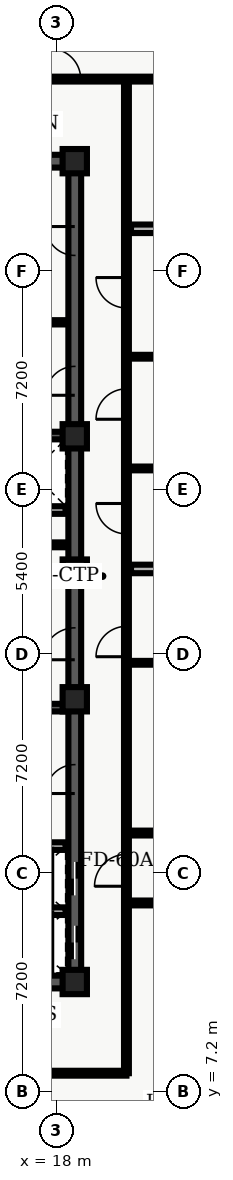
"""IFC4 building model, lengths in metres.
Left out: names, types, materials, properties, quantities, classifications, styles, units other than length and angle.
Written with IfcOpenShell. Run it as: python <this file> out.ifc"""

import sys

from ifc_helpers import new_model, entity, si_unit, converted_unit, direction, frame, origin_with_axes, origin_2d_with_axis, place, context, subcontext, project, spatial, polyline, rectangle, outline, extrude, element, fill, save


model = new_model("IFC4")
c1 = context("Model", 3, precision=1e-05, world=origin_with_axes(), true_north=direction((0.0, 1.0)))
c2 = subcontext(c1, "Body", "Model", "MODEL_VIEW")
j1 = project(units=[si_unit("LENGTHUNIT", "METRE"), converted_unit("PLANEANGLEUNIT", "DEGREE", entity("IfcPlaneAngleMeasure", 0.017), si_unit("PLANEANGLEUNIT", "RADIAN"), dimensions=[0, 0, 0, 0, 0, 0, 0])], contexts=[c1])
p1 = place(None, origin_with_axes())
s1 = spatial("IfcSite", under=j1, at=p1, CompositionType="ELEMENT")
p2 = place(p1, origin_with_axes())
s2 = spatial("IfcBuilding", under=s1, at=p2, CompositionType="ELEMENT")
p3 = place(p2, frame((0.0, 0.0, 280.2), z_axis=(0.0, 0.0, 1.0), x_axis=(1.0, 0.0, 0.0)))
s3 = spatial("IfcBuildingStorey", under=s2, at=p3, CompositionType="ELEMENT", Elevation=280.2)
p4 = place(p3, frame((11.4, 10.8, 0.0), z_axis=(0.0, 0.0, 1.0), x_axis=(1.0, 0.0, 0.0)))
e1 = element("IfcWall", 1, at=p4, inside=s3, PredefinedType="SHEAR", context=c2, shape_type="SweptSolid", body=[
    extrude(outline(polyline([(0.0, -0.21), (7.2, -0.21), (7.2, 0.21), (0.0, 0.21), (0.0, -0.21)])), origin_with_axes(), (0.0, 0.0, 1.0), 3.66),
])
p5 = place(p4, frame((2.625, 0.0, 0.0), z_axis=(0.0, 0.0, 1.0), x_axis=(1.0, 0.0, 0.0)))
e2 = element("IfcOpeningElement", 2, at=p5, cuts=e1, PredefinedType="OPENING", context=c2, shape_type="SweptSolid", body=[
    extrude(rectangle(XDim=1.05, YDim=0.44, at=origin_2d_with_axis()), origin_with_axes(), (0.0, 0.0, 1.0), 2.15),
])
p6 = place(p3, frame((11.4, 37.8, 0.0), z_axis=(0.0, 0.0, 1.0), x_axis=(1.0, 0.0, 0.0)))
e3 = element("IfcWall", 3, at=p6, inside=s3, PredefinedType="SHEAR", context=c2, shape_type="SweptSolid", body=[
    extrude(outline(polyline([(0.0, -0.21), (7.2, -0.21), (7.2, 0.21), (0.0, 0.21), (0.0, -0.21)])), origin_with_axes(), (0.0, 0.0, 1.0), 3.66),
])
p7 = place(p6, frame((2.625, 0.0, 0.0), z_axis=(0.0, 0.0, 1.0), x_axis=(1.0, 0.0, 0.0)))
e4 = element("IfcOpeningElement", 4, at=p7, cuts=e3, PredefinedType="OPENING", context=c2, shape_type="SweptSolid", body=[
    extrude(rectangle(XDim=1.05, YDim=0.44, at=origin_2d_with_axis()), origin_with_axes(), (0.0, 0.0, 1.0), 2.15),
])
p8 = place(p3, frame((18.6, 10.8, 0.0), z_axis=(0.0, 0.0, 1.0), x_axis=(0.0, 1.0, 0.0)))
e5 = element("IfcWall", 5, at=p8, inside=s3, PredefinedType="SHEAR", context=c2, shape_type="SweptSolid", body=[
    extrude(outline(polyline([(0.0, -0.21), (13.5, -0.21), (13.5, 0.21), (0.0, 0.21), (0.0, -0.21)])), origin_with_axes(), (0.0, 0.0, 1.0), 3.66),
])
p9 = place(p8, frame((1.3, 0.0, 0.0), z_axis=(0.0, 0.0, 1.0), x_axis=(1.0, 0.0, 0.0)))
e6 = element("IfcOpeningElement", 6, at=p9, cuts=e5, PredefinedType="OPENING", context=c2, shape_type="SweptSolid", body=[
    extrude(rectangle(XDim=1.1, YDim=0.44, at=origin_2d_with_axis()), origin_with_axes(), (0.0, 0.0, 1.0), 2.15),
])
p10 = place(p8, frame((3.4, 0.0, 0.0), z_axis=(0.0, 0.0, 1.0), x_axis=(1.0, 0.0, 0.0)))
e7 = element("IfcOpeningElement", 7, at=p10, cuts=e5, PredefinedType="OPENING", context=c2, shape_type="SweptSolid", body=[
    extrude(rectangle(XDim=1.1, YDim=0.44, at=origin_2d_with_axis()), origin_with_axes(), (0.0, 0.0, 1.0), 2.15),
])
p11 = place(p8, frame((11.125, 0.0, 0.0), z_axis=(0.0, 0.0, 1.0), x_axis=(1.0, 0.0, 0.0)))
e8 = element("IfcOpeningElement", 8, at=p11, cuts=e5, PredefinedType="OPENING", context=c2, shape_type="SweptSolid", body=[
    extrude(rectangle(XDim=1.05, YDim=0.44, at=origin_2d_with_axis()), origin_with_axes(), (0.0, 0.0, 1.0), 2.15),
])
p12 = place(p8, frame((6.675, 0.0, 0.0), z_axis=(0.0, 0.0, 1.0), x_axis=(1.0, 0.0, 0.0)))
e9 = element("IfcOpeningElement", 9, at=p12, cuts=e5, PredefinedType="OPENING", context=c2, shape_type="SweptSolid", body=[
    extrude(rectangle(XDim=0.95, YDim=0.44, at=origin_2d_with_axis()), origin_with_axes(), (0.0, 0.0, 1.0), 2.15),
])
p13 = place(p3, frame((18.6, 24.3, 0.0), z_axis=(0.0, 0.0, 1.0), x_axis=(0.0, 1.0, 0.0)))
e10 = element("IfcWall", 10, at=p13, inside=s3, PredefinedType="SHEAR", context=c2, shape_type="SweptSolid", body=[
    extrude(outline(polyline([(0.0, -0.21), (13.5, -0.21), (13.5, 0.21), (0.0, 0.21), (0.0, -0.21)])), origin_with_axes(), (0.0, 0.0, 1.0), 3.66),
])
p14 = place(p13, frame((6.275, 0.0, 0.0), z_axis=(0.0, 0.0, 1.0), x_axis=(1.0, 0.0, 0.0)))
e11 = element("IfcOpeningElement", 11, at=p14, cuts=e10, PredefinedType="OPENING", context=c2, shape_type="SweptSolid", body=[
    extrude(rectangle(XDim=0.95, YDim=0.44, at=origin_2d_with_axis()), origin_with_axes(), (0.0, 0.0, 1.0), 2.15),
])
p15 = place(p13, frame((10.875, 0.0, 0.0), z_axis=(0.0, 0.0, 1.0), x_axis=(1.0, 0.0, 0.0)))
e12 = element("IfcOpeningElement", 12, at=p15, cuts=e10, PredefinedType="OPENING", context=c2, shape_type="SweptSolid", body=[
    extrude(rectangle(XDim=0.95, YDim=0.44, at=origin_2d_with_axis()), origin_with_axes(), (0.0, 0.0, 1.0), 2.15),
])
for number, where, z_axis, x_axis in (
    (13, (11.61, 19.825, 0.0), (0.0, 0.0, 1.0), (1.0, 0.0, 0.0)),
    (14, (11.61, 28.775, 0.0), (0.0, 0.0, 1.0), (1.0, 0.0, 0.0)),
):
    element("IfcWall", number, at=place(p3, frame(where, z_axis=z_axis, x_axis=x_axis)), inside=s3, PredefinedType="SHEAR", context=c2, shape_type="SweptSolid", body=[
        extrude(outline(polyline([(0.0, -0.125), (6.78, -0.125), (6.78, 0.125), (0.0, 0.125), (0.0, -0.125)])), origin_with_axes(), (0.0, 0.0, 1.0), 3.66),
    ])
p16 = place(p3, frame((11.7, 24.1, 0.0), z_axis=(0.0, 0.0, 1.0), x_axis=(1.0, 0.0, 0.0)))
e15 = element("IfcWall", 15, at=p16, inside=s3, PredefinedType="SOLIDWALL", context=c2, shape_type="SweptSolid", body=[
    extrude(outline(polyline([(0.0, -0.125), (6.6, -0.125), (6.6, 0.125), (0.0, 0.125), (0.0, -0.125)])), origin_with_axes(), (0.0, 0.0, 1.0), 2.7),
])
p17 = place(p16, frame((3.75, 0.0, 0.0), z_axis=(0.0, 0.0, 1.0), x_axis=(1.0, 0.0, 0.0)))
e16 = element("IfcOpeningElement", 16, at=p17, cuts=e15, PredefinedType="OPENING", context=c2, shape_type="SweptSolid", body=[
    extrude(rectangle(XDim=0.9, YDim=0.27, at=origin_2d_with_axis()), origin_with_axes(), (0.0, 0.0, 1.0), 2.15),
])
p18 = place(p3, frame((11.7, 26.325, 0.0), z_axis=(0.0, 0.0, 1.0), x_axis=(1.0, 0.0, 0.0)))
e17 = element("IfcWall", 17, at=p18, inside=s3, PredefinedType="SOLIDWALL", context=c2, shape_type="SweptSolid", body=[
    extrude(outline(polyline([(0.0, -0.125), (6.6, -0.125), (6.6, 0.125), (0.0, 0.125), (0.0, -0.125)])), origin_with_axes(), (0.0, 0.0, 1.0), 2.7),
])
p19 = place(p18, frame((3.5, 0.0, 0.0), z_axis=(0.0, 0.0, 1.0), x_axis=(1.0, 0.0, 0.0)))
e18 = element("IfcOpeningElement", 18, at=p19, cuts=e17, PredefinedType="OPENING", context=c2, shape_type="SweptSolid", body=[
    extrude(rectangle(XDim=0.9, YDim=0.27, at=origin_2d_with_axis()), origin_with_axes(), (0.0, 0.0, 1.0), 2.15),
])
for number, where, z_axis, x_axis in (
    (19, (18.6, 10.8, 0.0), (0.0, 0.0, 1.0), (1.0, 0.0, 0.0)),
    (20, (18.6, 20.1, 0.0), (0.0, 0.0, 1.0), (1.0, 0.0, 0.0)),
    (21, (18.6, 24.3, 0.0), (0.0, 0.0, 1.0), (1.0, 0.0, 0.0)),
    (22, (18.6, 28.75, 0.0), (0.0, 0.0, 1.0), (1.0, 0.0, 0.0)),
    (23, (18.6, 37.8, 0.0), (0.0, 0.0, 1.0), (1.0, 0.0, 0.0)),
):
    element("IfcColumn", number, at=place(p3, frame(where, z_axis=z_axis, x_axis=x_axis)), inside=s3, PredefinedType="COLUMN", context=c2, shape_type="SweptSolid", body=[
        extrude(rectangle(XDim=0.8, YDim=0.8, at=origin_2d_with_axis()), origin_with_axes(), (0.0, 0.0, 1.0), 3.9),
    ])
p20 = place(p3, frame((14.62, 25.18, 0.0), z_axis=(0.0, 0.0, 1.0), x_axis=(1.0, 0.0, 0.0)))
e24 = element("IfcWall", 24, at=p20, inside=s3, PredefinedType="PARTITIONING", context=c2, shape_type="SweptSolid", body=[
    extrude(outline(polyline([(0.0, -0.08), (3.68, -0.08), (3.68, 0.08), (0.0, 0.08), (0.0, -0.08)])), origin_with_axes(), (0.0, 0.0, 1.0), 2.7),
])
p21 = place(p20, frame((1.95, 0.0, 0.0), z_axis=(0.0, 0.0, 1.0), x_axis=(1.0, 0.0, 0.0)))
e25 = element("IfcOpeningElement", 25, at=p21, cuts=e24, PredefinedType="OPENING", context=c2, shape_type="SweptSolid", body=[
    extrude(rectangle(XDim=0.9, YDim=0.18, at=origin_2d_with_axis()), origin_with_axes(), (0.0, 0.0, 1.0), 2.15),
])
for number, where, z_axis, x_axis in (
    (26, (15.84, 13.13, 0.0), (0.0, 0.0, 1.0), (1.0, 0.0, 0.0)),
    (27, (15.84, 15.27, 0.0), (0.0, 0.0, 1.0), (1.0, 0.0, 0.0)),
):
    element("IfcWall", number, at=place(p3, frame(where, z_axis=z_axis, x_axis=x_axis)), inside=s3, PredefinedType="SOLIDWALL", context=c2, shape_type="SweptSolid", body=[
        extrude(outline(polyline([(0.0, -0.125), (2.46, -0.125), (2.46, 0.125), (0.0, 0.125), (0.0, -0.125)])), origin_with_axes(), (0.0, 0.0, 1.0), 2.7),
    ])
p22 = place(p3, frame((15.84, 32.5, 0.0), z_axis=(0.0, 0.0, 1.0), x_axis=(1.0, 0.0, 0.0)))
e28 = element("IfcWall", 28, at=p22, inside=s3, PredefinedType="PARTITIONING", context=c2, shape_type="SweptSolid", body=[
    extrude(outline(polyline([(0.0, -0.07), (2.46, -0.07), (2.46, 0.07), (0.0, 0.07), (0.0, -0.07)])), origin_with_axes(), (0.0, 0.0, 1.0), 2.7),
])
p23 = place(p3, frame((8.135, 7.8, 0.0), z_axis=(0.0, 0.0, 1.0), x_axis=(1.0, 0.0, 0.0)))
e29 = element("IfcWall", 29, at=p23, inside=s3, PredefinedType="PARTITIONING", context=c2, shape_type="SweptSolid", body=[
    extrude(outline(polyline([(0.0, -0.08), (12.165, -0.08), (12.165, 0.08), (0.0, 0.08), (0.0, -0.08)])), origin_with_axes(), (0.0, 0.0, 1.0), 2.7),
])
p24 = place(p23, frame((6.065, 0.0, 0.0), z_axis=(0.0, 0.0, 1.0), x_axis=(1.0, 0.0, 0.0)))
e30 = element("IfcOpeningElement", 30, at=p24, cuts=e29, PredefinedType="OPENING", context=c2, shape_type="SweptSolid", body=[
    extrude(rectangle(XDim=1.0, YDim=0.18, at=origin_2d_with_axis()), origin_with_axes(), (0.0, 0.0, 1.0), 2.15),
])
p25 = place(p3, frame((8.135, 40.5, 0.0), z_axis=(0.0, 0.0, 1.0), x_axis=(1.0, 0.0, 0.0)))
e31 = element("IfcWall", 31, at=p25, inside=s3, PredefinedType="PARTITIONING", context=c2, shape_type="SweptSolid", body=[
    extrude(outline(polyline([(0.0, -0.08), (23.93, -0.08), (23.93, 0.08), (0.0, 0.08), (0.0, -0.08)])), origin_with_axes(), (0.0, 0.0, 1.0), 2.7),
])
p26 = place(p25, frame((0.871, 0.0, 0.0), z_axis=(0.0, 0.0, 1.0), x_axis=(1.0, 0.0, 0.0)))
e32 = element("IfcOpeningElement", 32, at=p26, cuts=e31, PredefinedType="OPENING", context=c2, shape_type="SweptSolid", body=[
    extrude(rectangle(XDim=1.0, YDim=0.18, at=origin_2d_with_axis()), origin_with_axes(), (0.0, 0.0, 1.0), 2.15),
])
p27 = place(p25, frame((6.56, 0.0, 0.0), z_axis=(0.0, 0.0, 1.0), x_axis=(1.0, 0.0, 0.0)))
e33 = element("IfcOpeningElement", 33, at=p27, cuts=e31, PredefinedType="OPENING", context=c2, shape_type="SweptSolid", body=[
    extrude(rectangle(XDim=1.0, YDim=0.18, at=origin_2d_with_axis()), origin_with_axes(), (0.0, 0.0, 1.0), 2.15),
])
p28 = place(p25, frame((10.16, 0.0, 0.0), z_axis=(0.0, 0.0, 1.0), x_axis=(1.0, 0.0, 0.0)))
e34 = element("IfcOpeningElement", 34, at=p28, cuts=e31, PredefinedType="OPENING", context=c2, shape_type="SweptSolid", body=[
    extrude(rectangle(XDim=1.0, YDim=0.18, at=origin_2d_with_axis()), origin_with_axes(), (0.0, 0.0, 1.0), 2.15),
])
p29 = place(p3, frame((20.3, 7.8, 0.0), z_axis=(0.0, 0.0, 1.0), x_axis=(0.0, 1.0, 0.0)))
e35 = element("IfcWall", 35, at=p29, inside=s3, PredefinedType="PARTITIONING", context=c2, shape_type="SweptSolid", body=[
    extrude(outline(polyline([(0.0, -0.08), (32.7, -0.08), (32.7, 0.08), (0.0, 0.08), (0.0, -0.08)])), origin_with_axes(), (0.0, 0.0, 1.0), 2.7),
])
p30 = place(p29, frame((14.2, 0.0, 0.0), z_axis=(0.0, 0.0, 1.0), x_axis=(1.0, 0.0, 0.0)))
e36 = element("IfcOpeningElement", 36, at=p30, cuts=e35, PredefinedType="OPENING", context=c2, shape_type="SweptSolid", body=[
    extrude(rectangle(XDim=1.0, YDim=0.18, at=origin_2d_with_axis()), origin_with_axes(), (0.0, 0.0, 1.0), 2.15),
])
p31 = place(p29, frame((18.24, 0.0, 0.0), z_axis=(0.0, 0.0, 1.0), x_axis=(1.0, 0.0, 0.0)))
e37 = element("IfcOpeningElement", 37, at=p31, cuts=e35, PredefinedType="OPENING", context=c2, shape_type="SweptSolid", body=[
    extrude(rectangle(XDim=1.0, YDim=0.18, at=origin_2d_with_axis()), origin_with_axes(), (0.0, 0.0, 1.0), 2.15),
])
p32 = place(p29, frame((22.011, 0.0, 0.0), z_axis=(0.0, 0.0, 1.0), x_axis=(1.0, 0.0, 0.0)))
e38 = element("IfcOpeningElement", 38, at=p32, cuts=e35, PredefinedType="OPENING", context=c2, shape_type="SweptSolid", body=[
    extrude(rectangle(XDim=1.0, YDim=0.18, at=origin_2d_with_axis()), origin_with_axes(), (0.0, 0.0, 1.0), 2.15),
])
p33 = place(p29, frame((25.672, 0.0, 0.0), z_axis=(0.0, 0.0, 1.0), x_axis=(1.0, 0.0, 0.0)))
e39 = element("IfcOpeningElement", 39, at=p33, cuts=e35, PredefinedType="OPENING", context=c2, shape_type="SweptSolid", body=[
    extrude(rectangle(XDim=1.0, YDim=0.18, at=origin_2d_with_axis()), origin_with_axes(), (0.0, 0.0, 1.0), 2.15),
])
p34 = place(p29, frame((6.675, 0.0, 0.0), z_axis=(0.0, 0.0, 1.0), x_axis=(1.0, 0.0, 0.0)))
e40 = element("IfcOpeningElement", 40, at=p34, cuts=e35, PredefinedType="OPENING", context=c2, shape_type="SweptSolid", body=[
    extrude(rectangle(XDim=1.05, YDim=0.18, at=origin_2d_with_axis()), origin_with_axes(), (0.0, 0.0, 1.0), 2.15),
])
p35 = place(p3, frame((20.45, 24.387, 0.0), z_axis=(0.0, 0.0, 1.0), x_axis=(1.0, 0.0, 0.0)))
e41 = element("IfcWall", 41, at=p35, inside=s3, PredefinedType="PARTITIONING", context=c2, shape_type="SweptSolid", body=[
    extrude(outline(polyline([(0.0, -0.14), (11.615, -0.14), (11.615, 0.14), (0.0, 0.14), (0.0, -0.14)])), origin_with_axes(), (0.0, 0.0, 1.0), 2.7),
])
for number, where, z_axis, x_axis in (
    (42, (20.45, 27.693, 0.0), (0.0, 0.0, 1.0), (1.0, 0.0, 0.0)),
    (43, (20.45, 31.368, 0.0), (0.0, 0.0, 1.0), (1.0, 0.0, 0.0)),
):
    element("IfcWall", number, at=place(p3, frame(where, z_axis=z_axis, x_axis=x_axis)), inside=s3, PredefinedType="PARTITIONING", context=c2, shape_type="SweptSolid", body=[
        extrude(outline(polyline([(0.0, -0.062), (11.615, -0.062), (11.615, 0.062), (0.0, 0.062), (0.0, -0.062)])), origin_with_axes(), (0.0, 0.0, 1.0), 2.7),
    ])
p36 = place(p3, frame((20.45, 35.576, 0.0), z_axis=(0.0, 0.0, 1.0), x_axis=(1.0, 0.0, 0.0)))
e44 = element("IfcWall", 44, at=p36, inside=s3, PredefinedType="PARTITIONING", context=c2, shape_type="SweptSolid", body=[
    extrude(outline(polyline([(0.0, -0.14), (11.615, -0.14), (11.615, 0.14), (0.0, 0.14), (0.0, -0.14)])), origin_with_axes(), (0.0, 0.0, 1.0), 2.7),
])
p37 = place(p36, frame((5.785, 0.0, 0.0), z_axis=(0.0, 0.0, 1.0), x_axis=(1.0, 0.0, 0.0)))
e45 = element("IfcOpeningElement", 45, at=p37, cuts=e44, PredefinedType="OPENING", context=c2, shape_type="SweptSolid", body=[
    extrude(rectangle(XDim=0.95, YDim=0.3, at=origin_2d_with_axis()), origin_with_axes(), (0.0, 0.0, 1.0), 2.15),
])
p38 = place(p3, frame((20.3, 13.4, 0.0), z_axis=(0.0, 0.0, 1.0), x_axis=(1.0, 0.0, 0.0)))
e46 = element("IfcWall", 46, at=p38, inside=s3, PredefinedType="PARTITIONING", context=c2, shape_type="SweptSolid", body=[
    extrude(outline(polyline([(0.0, -0.08), (15.45, -0.08), (15.45, 0.08), (0.0, 0.08), (0.0, -0.08)])), origin_with_axes(), (0.0, 0.0, 1.0), 2.7),
])
p39 = place(p38, frame((2.304, 0.0, 0.0), z_axis=(0.0, 0.0, 1.0), x_axis=(1.0, 0.0, 0.0)))
e47 = element("IfcOpeningElement", 47, at=p39, cuts=e46, PredefinedType="OPENING", context=c2, shape_type="SweptSolid", body=[
    extrude(rectangle(XDim=1.0, YDim=0.18, at=origin_2d_with_axis()), origin_with_axes(), (0.0, 0.0, 1.0), 2.15),
])
p40 = place(p38, frame((6.866, 0.0, 0.0), z_axis=(0.0, 0.0, 1.0), x_axis=(1.0, 0.0, 0.0)))
e48 = element("IfcOpeningElement", 48, at=p40, cuts=e46, PredefinedType="OPENING", context=c2, shape_type="SweptSolid", body=[
    extrude(rectangle(XDim=1.0, YDim=0.18, at=origin_2d_with_axis()), origin_with_axes(), (0.0, 0.0, 1.0), 2.15),
])
p41 = place(p38, frame((12.337, 0.0, 0.0), z_axis=(0.0, 0.0, 1.0), x_axis=(1.0, 0.0, 0.0)))
e49 = element("IfcOpeningElement", 49, at=p41, cuts=e46, PredefinedType="OPENING", context=c2, shape_type="SweptSolid", body=[
    extrude(rectangle(XDim=1.2, YDim=0.18, at=origin_2d_with_axis()), origin_with_axes(), (0.0, 0.0, 1.0), 2.2),
])
p42 = place(p3, frame((20.3, 15.7, 0.0), z_axis=(0.0, 0.0, 1.0), x_axis=(1.0, 0.0, 0.0)))
e50 = element("IfcWall", 50, at=p42, inside=s3, PredefinedType="PARTITIONING", context=c2, shape_type="SweptSolid", body=[
    extrude(outline(polyline([(0.0, -0.08), (15.45, -0.08), (15.45, 0.08), (0.0, 0.08), (0.0, -0.08)])), origin_with_axes(), (0.0, 0.0, 1.0), 2.7),
])
p43 = place(p42, frame((7.775, 0.0, 0.0), z_axis=(0.0, 0.0, 1.0), x_axis=(1.0, 0.0, 0.0)))
e51 = element("IfcOpeningElement", 51, at=p43, cuts=e50, PredefinedType="OPENING", context=c2, shape_type="SweptSolid", body=[
    extrude(rectangle(XDim=1.0, YDim=0.18, at=origin_2d_with_axis()), origin_with_axes(), (0.0, 0.0, 1.0), 2.15),
])
p44 = place(p3, frame((20.3, 21.3, 0.0), z_axis=(0.0, 0.0, 1.0), x_axis=(1.0, 0.0, 0.0)))
e52 = element("IfcWall", 52, at=p44, inside=s3, PredefinedType="PARTITIONING", context=c2, shape_type="SweptSolid", body=[
    extrude(outline(polyline([(0.0, -0.062), (11.765, -0.062), (11.765, 0.062), (0.0, 0.062), (0.0, -0.062)])), origin_with_axes(), (0.0, 0.0, 1.0), 2.7),
])
p45 = place(p8, frame((1.3, 0.0, 0.0), z_axis=(0.0, 0.0, 1.0), x_axis=(1.0, 0.0, 0.0)))
e53 = element("IfcDoor", 53, at=p45, inside=s3, OperationType="SLIDING_TO_LEFT", PredefinedType="DOOR", context=c2, shape_type="SweptSolid", body=[
    extrude(rectangle(XDim=1.1, YDim=0.09, at=origin_2d_with_axis()), origin_with_axes(), (0.0, 0.0, 1.0), 2.15),
])
fill(e6, e53)
p46 = place(p8, frame((3.4, 0.0, 0.0), z_axis=(0.0, 0.0, 1.0), x_axis=(1.0, 0.0, 0.0)))
e54 = element("IfcDoor", 54, at=p46, inside=s3, OperationType="SLIDING_TO_RIGHT", PredefinedType="DOOR", context=c2, shape_type="SweptSolid", body=[
    extrude(rectangle(XDim=1.1, YDim=0.09, at=origin_2d_with_axis()), origin_with_axes(), (0.0, 0.0, 1.0), 2.15),
])
fill(e7, e54)
p47 = place(p8, frame((11.125, 0.0, 0.0), z_axis=(0.0, 0.0, 1.0), x_axis=(1.0, 0.0, 0.0)))
e55 = element("IfcDoor", 55, at=p47, inside=s3, OperationType="SINGLE_SWING_LEFT", PredefinedType="DOOR", context=c2, shape_type="SweptSolid", body=[
    extrude(rectangle(XDim=1.05, YDim=0.09, at=origin_2d_with_axis()), origin_with_axes(), (0.0, 0.0, 1.0), 2.15),
])
fill(e8, e55)
p48 = place(p8, frame((6.675, 0.0, 0.0), z_axis=(0.0, 0.0, 1.0), x_axis=(1.0, 0.0, 0.0)))
e56 = element("IfcDoor", 56, at=p48, inside=s3, OperationType="SINGLE_SWING_LEFT", PredefinedType="DOOR", context=c2, shape_type="SweptSolid", body=[
    extrude(rectangle(XDim=0.95, YDim=0.09, at=origin_2d_with_axis()), origin_with_axes(), (0.0, 0.0, 1.0), 2.15),
])
fill(e9, e56)
p49 = place(p13, frame((6.275, 0.0, 0.0), z_axis=(0.0, 0.0, 1.0), x_axis=(1.0, 0.0, 0.0)))
e57 = element("IfcDoor", 57, at=p49, inside=s3, OperationType="SINGLE_SWING_LEFT", PredefinedType="DOOR", context=c2, shape_type="SweptSolid", body=[
    extrude(rectangle(XDim=0.95, YDim=0.09, at=origin_2d_with_axis()), origin_with_axes(), (0.0, 0.0, 1.0), 2.15),
])
fill(e11, e57)
p50 = place(p13, frame((10.875, 0.0, 0.0), z_axis=(0.0, 0.0, 1.0), x_axis=(1.0, 0.0, 0.0)))
e58 = element("IfcDoor", 58, at=p50, inside=s3, OperationType="SINGLE_SWING_RIGHT", PredefinedType="DOOR", context=c2, shape_type="SweptSolid", body=[
    extrude(rectangle(XDim=0.95, YDim=0.09, at=origin_2d_with_axis()), origin_with_axes(), (0.0, 0.0, 1.0), 2.15),
])
fill(e12, e58)
p51 = place(p25, frame((10.16, 0.0, 0.0), z_axis=(0.0, 0.0, 1.0), x_axis=(1.0, 0.0, 0.0)))
e59 = element("IfcDoor", 59, at=p51, inside=s3, OperationType="SINGLE_SWING_LEFT", PredefinedType="DOOR", context=c2, shape_type="SweptSolid", body=[
    extrude(rectangle(XDim=1.0, YDim=0.09, at=origin_2d_with_axis()), origin_with_axes(), (0.0, 0.0, 1.0), 2.15),
])
fill(e34, e59)
p52 = place(p29, frame((14.2, 0.0, 0.0), z_axis=(0.0, 0.0, 1.0), x_axis=(1.0, 0.0, 0.0)))
e60 = element("IfcDoor", 60, at=p52, inside=s3, OperationType="SINGLE_SWING_LEFT", PredefinedType="DOOR", context=c2, shape_type="SweptSolid", body=[
    extrude(rectangle(XDim=1.0, YDim=0.09, at=origin_2d_with_axis()), origin_with_axes(), (0.0, 0.0, 1.0), 2.15),
])
fill(e36, e60)
p53 = place(p29, frame((18.24, 0.0, 0.0), z_axis=(0.0, 0.0, 1.0), x_axis=(1.0, 0.0, 0.0)))
e61 = element("IfcDoor", 61, at=p53, inside=s3, OperationType="SINGLE_SWING_RIGHT", PredefinedType="DOOR", context=c2, shape_type="SweptSolid", body=[
    extrude(rectangle(XDim=1.0, YDim=0.09, at=origin_2d_with_axis()), origin_with_axes(), (0.0, 0.0, 1.0), 2.15),
])
fill(e37, e61)
p54 = place(p29, frame((22.011, 0.0, 0.0), z_axis=(0.0, 0.0, 1.0), x_axis=(1.0, 0.0, 0.0)))
e62 = element("IfcDoor", 62, at=p54, inside=s3, OperationType="SINGLE_SWING_LEFT", PredefinedType="DOOR", context=c2, shape_type="SweptSolid", body=[
    extrude(rectangle(XDim=1.0, YDim=0.09, at=origin_2d_with_axis()), origin_with_axes(), (0.0, 0.0, 1.0), 2.15),
])
fill(e38, e62)
p55 = place(p29, frame((25.672, 0.0, 0.0), z_axis=(0.0, 0.0, 1.0), x_axis=(1.0, 0.0, 0.0)))
e63 = element("IfcDoor", 63, at=p55, inside=s3, OperationType="SINGLE_SWING_RIGHT", PredefinedType="DOOR", context=c2, shape_type="SweptSolid", body=[
    extrude(rectangle(XDim=1.0, YDim=0.09, at=origin_2d_with_axis()), origin_with_axes(), (0.0, 0.0, 1.0), 2.15),
])
fill(e39, e63)
p56 = place(p29, frame((6.675, 0.0, 0.0), z_axis=(0.0, 0.0, 1.0), x_axis=(1.0, 0.0, 0.0)))
e64 = element("IfcDoor", 64, at=p56, inside=s3, OperationType="SINGLE_SWING_LEFT", PredefinedType="DOOR", context=c2, shape_type="SweptSolid", body=[
    extrude(rectangle(XDim=1.05, YDim=0.09, at=origin_2d_with_axis()), origin_with_axes(), (0.0, 0.0, 1.0), 2.15),
])
fill(e40, e64)
save(model, sys.argv[1])
